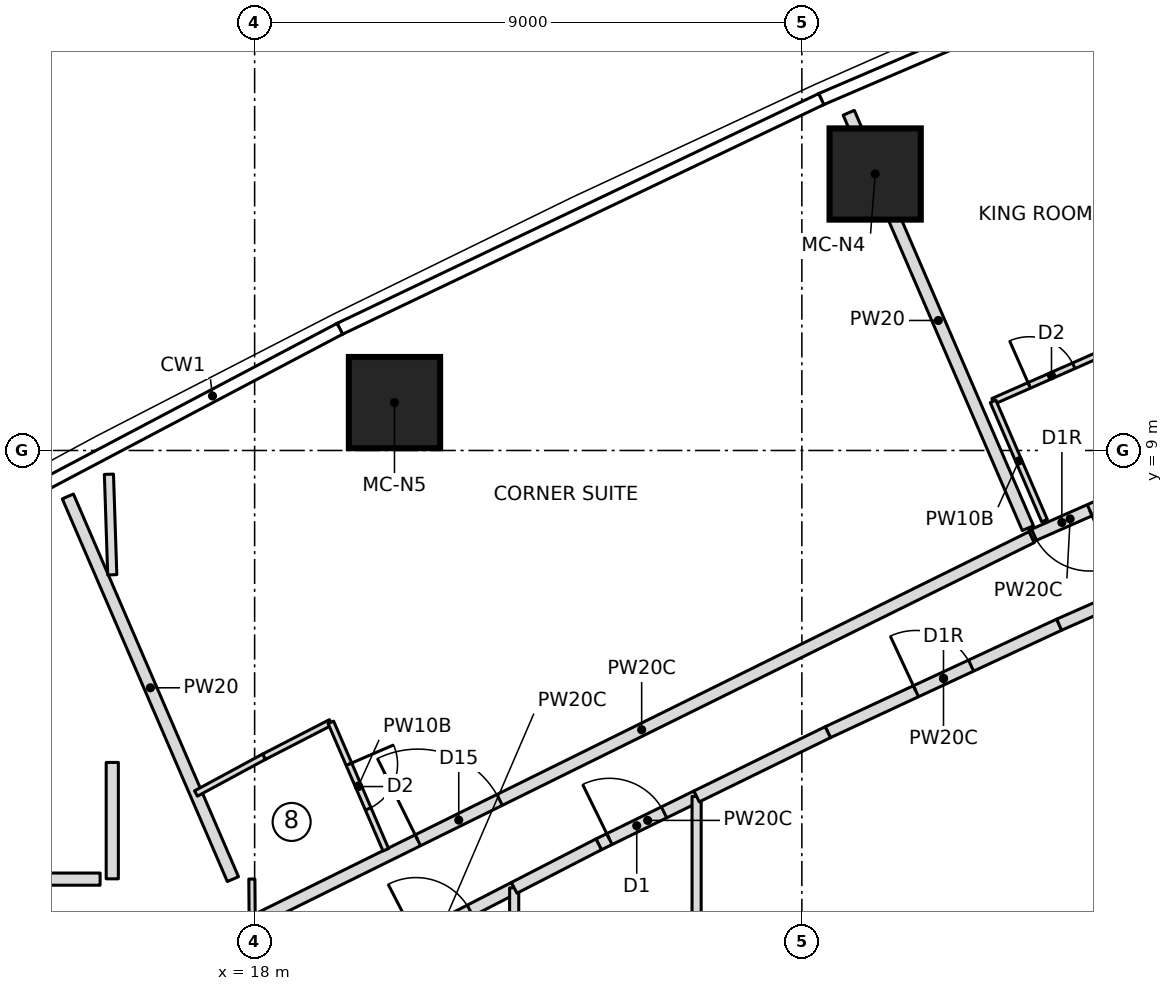
"""IFC4 building model, lengths in metres.
Left out: names, types, materials, properties, quantities, classifications, styles, units other than length and angle.
Written with IfcOpenShell. Run it as: python <this file> out.ifc"""

import sys

from ifc_helpers import new_model, si_unit, direction, frame, frame_2d, origin, origin_2d, place, context, subcontext, project, spatial, rectangle, extrude, element, fill, save


model = new_model("IFC4")
c1 = context("Model", 3, precision=1e-05, world=origin(), true_north=direction((0.0, 1.0)))
c2 = subcontext(c1, "Body", "Model", "MODEL_VIEW")
j1 = project(units=[si_unit("LENGTHUNIT", "METRE"), si_unit("PLANEANGLEUNIT", "RADIAN")], contexts=[c1])
p1 = place(None, origin())
s1 = spatial("IfcSite", under=j1, at=p1, CompositionType="ELEMENT")
p2 = place(p1, origin())
s2 = spatial("IfcBuilding", under=s1, at=p2, CompositionType="ELEMENT")
p3 = place(p2, frame((0.0, 0.0, 133.75)))
s3 = spatial("IfcBuildingStorey", under=s2, at=p3, CompositionType="ELEMENT", Elevation=133.75)
for number, where, z_axis, x_axis in (
    (1, (28.205, 13.547, 0.0), (0.0, 0.0, 1.0), (1.0, 0.0, 0.0)),
    (2, (20.3, 9.788, 0.0), (0.0, 0.0, 1.0), (1.0, 0.0, 0.0)),
):
    element("IfcColumn", number, at=place(p3, frame(where, z_axis=z_axis, x_axis=x_axis)), inside=s3, PredefinedType="COLUMN", context=c2, shape_type="SweptSolid", body=[
        extrude(rectangle(XDim=1.5, YDim=1.5, at=origin_2d()), origin(), (0.0, 0.0, 1.0), 3.55),
    ])
p4 = place(p3, frame((5.654, 1.95, 0.0), z_axis=(0.0, 0.0, 1.0), x_axis=(1.0, 0.0, 0.0)))
e3 = element("IfcWall", 3, at=p4, inside=s3, PredefinedType="PARTITIONING", context=c2, shape_type="SweptSolid", body=[
    extrude(rectangle(XDim=9.804, YDim=0.2, at=frame_2d((4.902, 0.0))), origin(), (0.0, 0.0, 1.0), 3.25),
])
p5 = place(p4, frame((4.618, 0.0, 0.0)))
e4 = element("IfcOpeningElement", 4, at=p5, cuts=e3, PredefinedType="OPENING", context=c2, shape_type="SweptSolid", body=[
    extrude(rectangle(XDim=1.0, YDim=2.1, at=frame_2d((0.5, 1.05))), frame((0.0, 0.11, 0.0), z_axis=(0.0, -1.0, 0.0), x_axis=(1.0, 0.0, 0.0)), (0.0, 0.0, 1.0), 0.22),
])
p6 = place(p3, frame((17.643, 1.95, 0.0), z_axis=(0.0, 0.0, 1.0), x_axis=(-0.395994543879, 0.918252863441, 0.0)))
e5 = element("IfcWall", 5, at=p6, inside=s3, PredefinedType="PARTITIONING", context=c2, shape_type="SweptSolid", body=[
    extrude(rectangle(XDim=6.854, YDim=0.2, at=frame_2d((3.427, 0.0))), origin(), (0.0, 0.0, 1.0), 3.25),
])
p7 = place(p3, frame((17.95, 1.238, 0.0), z_axis=(0.0, 0.0, 1.0), x_axis=(0.896593504408, 0.44285447706, 0.0)))
e6 = element("IfcWall", 6, at=p7, inside=s3, PredefinedType="PARTITIONING", context=c2, shape_type="SweptSolid", body=[
    extrude(rectangle(XDim=14.31, YDim=0.2, at=frame_2d((7.155, 0.0))), origin(), (0.0, 0.0, 1.0), 3.25),
])
p8 = place(p7, frame((3.05, 0.0, 0.0)))
e7 = element("IfcOpeningElement", 7, at=p8, cuts=e6, PredefinedType="OPENING", context=c2, shape_type="SweptSolid", body=[
    extrude(rectangle(XDim=1.5, YDim=2.1, at=frame_2d((0.75, 1.05))), frame((0.0, 0.11, 0.0), z_axis=(0.0, -1.0, 0.0), x_axis=(1.0, 0.0, 0.0)), (0.0, 0.0, 1.0), 0.22),
])
p9 = place(p3, frame((17.036, 3.358, 0.0), z_axis=(0.0, 0.0, 1.0), x_axis=(0.879823588489, 0.475300382009, 0.0)))
e8 = element("IfcWall", 8, at=p9, inside=s3, PredefinedType="PARTITIONING", context=c2, shape_type="SweptSolid", body=[
    extrude(rectangle(XDim=1.273, YDim=0.1, at=frame_2d((0.636, 0.0))), origin(), (0.0, 0.0, 1.0), 3.25),
])
p10 = place(p3, frame((18.156, 3.963, 0.0), z_axis=(0.0, 0.0, 1.0), x_axis=(0.889106231322, 0.457700895154, 0.0)))
e9 = element("IfcWall", 9, at=p10, inside=s3, PredefinedType="PARTITIONING", context=c2, shape_type="SweptSolid", body=[
    extrude(rectangle(XDim=1.235, YDim=0.1, at=frame_2d((0.617, 0.0))), origin(), (0.0, 0.0, 1.0), 3.25),
])
p11 = place(p3, frame((19.254, 4.529, 0.0), z_axis=(0.0, 0.0, 1.0), x_axis=(0.395958457437, -0.9182684248, 0.0)))
e10 = element("IfcWall", 10, at=p11, inside=s3, PredefinedType="PARTITIONING", context=c2, shape_type="SweptSolid", body=[
    extrude(rectangle(XDim=2.282, YDim=0.1, at=frame_2d((1.141, 0.0))), origin(), (0.0, 0.0, 1.0), 3.25),
])
p12 = place(p11, frame((0.75, 0.0, 0.0)))
e11 = element("IfcOpeningElement", 11, at=p12, cuts=e10, PredefinedType="OPENING", context=c2, shape_type="SweptSolid", body=[
    extrude(rectangle(XDim=0.8, YDim=2.1, at=frame_2d((0.4, 1.05))), frame((0.0, 0.06, 0.0), z_axis=(0.0, -1.0, 0.0), x_axis=(1.0, 0.0, 0.0)), (0.0, 0.0, 1.0), 0.12),
])
p13 = place(p3, frame((30.717, 7.722, 0.0), z_axis=(0.0, 0.0, 1.0), x_axis=(-0.395993466394, 0.918253328104, 0.0)))
e12 = element("IfcWall", 12, at=p13, inside=s3, PredefinedType="PARTITIONING", context=c2, shape_type="SweptSolid", body=[
    extrude(rectangle(XDim=7.44, YDim=0.2, at=frame_2d((3.72, 0.0))), origin(), (0.0, 0.0, 1.0), 3.25),
])
p14 = place(p3, frame((32.05, 8.157, 0.0), z_axis=(0.0, 0.0, 1.0), x_axis=(-0.915155082005, -0.403101942293, 0.0)))
e13 = element("IfcWall", 13, at=p14, inside=s3, PredefinedType="PARTITIONING", context=c2, shape_type="SweptSolid", body=[
    extrude(rectangle(XDim=1.396, YDim=0.2, at=frame_2d((0.698, 0.0))), origin(), (0.0, 0.0, 1.0), 3.25),
])
p15 = place(p14, frame((0.346, 0.0, 0.0)))
e14 = element("IfcOpeningElement", 14, at=p15, cuts=e13, PredefinedType="OPENING", context=c2, shape_type="SweptSolid", body=[
    extrude(rectangle(XDim=1.0, YDim=2.1, at=frame_2d((0.5, 1.05))), frame((0.0, 0.11, 0.0), z_axis=(0.0, -1.0, 0.0), x_axis=(1.0, 0.0, 0.0)), (0.0, 0.0, 1.0), 0.22),
])
p16 = place(p3, frame((30.144, 9.809, 0.0), z_axis=(0.0, 0.0, 1.0), x_axis=(0.915122534717, 0.40317582573, 0.0)))
e15 = element("IfcWall", 15, at=p16, inside=s3, PredefinedType="PARTITIONING", context=c2, shape_type="SweptSolid", body=[
    extrude(rectangle(XDim=2.058, YDim=0.1, at=frame_2d((1.029, 0.0))), origin(), (0.0, 0.0, 1.0), 3.25),
])
p17 = place(p16, frame((0.65, 0.0, 0.0)))
e16 = element("IfcOpeningElement", 16, at=p17, cuts=e15, PredefinedType="OPENING", context=c2, shape_type="SweptSolid", body=[
    extrude(rectangle(XDim=0.8, YDim=2.1, at=frame_2d((0.4, 1.05))), frame((0.0, 0.06, 0.0), z_axis=(0.0, -1.0, 0.0), x_axis=(1.0, 0.0, 0.0)), (0.0, 0.0, 1.0), 0.12),
])
p18 = place(p3, frame((30.99, 7.846, 0.0), z_axis=(0.0, 0.0, 1.0), x_axis=(-0.396055229638, 0.918226690462, 0.0)))
e17 = element("IfcWall", 17, at=p18, inside=s3, PredefinedType="PARTITIONING", context=c2, shape_type="SweptSolid", body=[
    extrude(rectangle(XDim=2.137, YDim=0.1, at=frame_2d((1.069, 0.0))), origin(), (0.0, 0.0, 1.0), 3.25),
])
p19 = place(p3, frame((34.092, 10.95, 0.0), z_axis=(0.0, 0.0, 1.0), x_axis=(-0.395991607501, 0.918254129742, 0.0)))
e18 = element("IfcWall", 18, at=p19, inside=s3, PredefinedType="PARTITIONING", context=c2, shape_type="SweptSolid", body=[
    extrude(rectangle(XDim=5.841, YDim=0.2, at=frame_2d((2.92, 0.0))), origin(), (0.0, 0.0, 1.0), 3.25),
])
p20 = place(p3, frame((19.928, 0.602, 0.0), z_axis=(0.0, 0.0, 1.0), x_axis=(0.889134700325, 0.457645588505, 0.0)))
e19 = element("IfcWall", 19, at=p20, inside=s3, PredefinedType="PARTITIONING", context=c2, shape_type="SweptSolid", body=[
    extrude(rectangle(XDim=2.632, YDim=0.2, at=frame_2d((1.316, 0.0))), origin(), (0.0, 0.0, 1.0), 3.25),
])
p21 = place(p20, frame((0.816, 0.0, 0.0)))
e20 = element("IfcOpeningElement", 20, at=p21, cuts=e19, PredefinedType="OPENING", context=c2, shape_type="SweptSolid", body=[
    extrude(rectangle(XDim=1.0, YDim=2.1, at=frame_2d((0.5, 1.05))), frame((0.0, 0.11, 0.0), z_axis=(0.0, -1.0, 0.0), x_axis=(1.0, 0.0, 0.0)), (0.0, 0.0, 1.0), 0.22),
])
p22 = place(p3, frame((22.269, -1.807, 0.0), z_axis=(0.0, 0.0, 1.0), x_axis=(0.0, 1.0, 0.0)))
e21 = element("IfcWall", 21, at=p22, inside=s3, PredefinedType="PARTITIONING", context=c2, shape_type="SweptSolid", body=[
    extrude(rectangle(XDim=3.613, YDim=0.15, at=frame_2d((1.807, 0.0))), origin(), (0.0, 0.0, 1.0), 3.25),
])
p23 = place(p3, frame((23.659, 2.522, 0.0), z_axis=(0.0, 0.0, 1.0), x_axis=(0.898127473276, 0.439735195028, 0.0)))
e22 = element("IfcWall", 22, at=p23, inside=s3, PredefinedType="PARTITIONING", context=c2, shape_type="SweptSolid", body=[
    extrude(rectangle(XDim=1.793, YDim=0.2, at=frame_2d((0.896, 0.0))), origin(), (0.0, 0.0, 1.0), 3.25),
])
p24 = place(p23, frame((0.196, 0.0, 0.0)))
e23 = element("IfcOpeningElement", 23, at=p24, cuts=e22, PredefinedType="OPENING", context=c2, shape_type="SweptSolid", body=[
    extrude(rectangle(XDim=1.0, YDim=2.1, at=frame_2d((0.5, 1.05))), frame((0.0, 0.11, 0.0), z_axis=(0.0, -1.0, 0.0), x_axis=(1.0, 0.0, 0.0)), (0.0, 0.0, 1.0), 0.22),
])
p25 = place(p3, frame((22.269, 1.807, 0.0), z_axis=(0.0, 0.0, 1.0), x_axis=(0.88914982879, 0.457616195039, 0.0)))
e24 = element("IfcWall", 24, at=p25, inside=s3, PredefinedType="PARTITIONING", context=c2, shape_type="SweptSolid", body=[
    extrude(rectangle(XDim=1.563, YDim=0.2, at=frame_2d((0.782, 0.0))), origin(), (0.0, 0.0, 1.0), 3.25),
])
p26 = place(p3, frame((25.269, -3.31, 0.0), z_axis=(0.0, 0.0, 1.0), x_axis=(0.0, 1.0, 0.0)))
e25 = element("IfcWall", 25, at=p26, inside=s3, PredefinedType="PARTITIONING", context=c2, shape_type="SweptSolid", body=[
    extrude(rectangle(XDim=6.621, YDim=0.15, at=frame_2d((3.31, 0.0))), origin(), (0.0, 0.0, 1.0), 3.25),
])
p27 = place(p3, frame((27.427, 4.367, 0.0), z_axis=(0.0, 0.0, 1.0), x_axis=(0.906830275285, 0.421495968933, 0.0)))
e26 = element("IfcWall", 26, at=p27, inside=s3, PredefinedType="PARTITIONING", context=c2, shape_type="SweptSolid", body=[
    extrude(rectangle(XDim=4.195, YDim=0.2, at=frame_2d((2.098, 0.0))), origin(), (0.0, 0.0, 1.0), 3.25),
])
p28 = place(p27, frame((1.598, 0.0, 0.0)))
e27 = element("IfcOpeningElement", 27, at=p28, cuts=e26, PredefinedType="OPENING", context=c2, shape_type="SweptSolid", body=[
    extrude(rectangle(XDim=1.0, YDim=2.1, at=frame_2d((0.5, 1.05))), frame((0.0, 0.11, 0.0), z_axis=(0.0, -1.0, 0.0), x_axis=(1.0, 0.0, 0.0)), (0.0, 0.0, 1.0), 0.22),
])
p29 = place(p3, frame((31.231, 6.135, 0.0), z_axis=(0.0, 0.0, 1.0), x_axis=(0.915102334452, 0.403221672881, 0.0)))
e28 = element("IfcWall", 28, at=p29, inside=s3, PredefinedType="PARTITIONING", context=c2, shape_type="SweptSolid", body=[
    extrude(rectangle(XDim=2.269, YDim=0.2, at=frame_2d((1.135, 0.0))), origin(), (0.0, 0.0, 1.0), 3.25),
])
p30 = place(p3, frame((25.269, 3.31, 0.0), z_axis=(0.0, 0.0, 1.0), x_axis=(0.898155255728, 0.439678446831, 0.0)))
e29 = element("IfcWall", 29, at=p30, inside=s3, PredefinedType="PARTITIONING", context=c2, shape_type="SweptSolid", body=[
    extrude(rectangle(XDim=2.403, YDim=0.2, at=frame_2d((1.201, 0.0))), origin(), (0.0, 0.0, 1.0), 3.25),
])
p31 = place(p3, frame((15.604, 8.609, 0.0), z_axis=(0.0, 0.0, 1.0), x_axis=(0.033196927484, -0.999448830109, 0.0)))
e30 = element("IfcWall", 30, at=p31, inside=s3, PredefinedType="PARTITIONING", context=c2, shape_type="SweptSolid", body=[
    extrude(rectangle(XDim=1.655, YDim=0.15, at=frame_2d((0.827, 0.0))), origin(), (0.0, 0.0, 1.0), 3.25),
])
p32 = place(p3, frame((17.96, 1.249, 0.0), z_axis=(0.0, 0.0, 1.0), x_axis=(-0.007291472831, 0.999973416859, 0.0)))
e31 = element("IfcWall", 31, at=p32, inside=s3, PredefinedType="PARTITIONING", context=c2, shape_type="SweptSolid", body=[
    extrude(rectangle(XDim=0.703, YDim=0.1, at=frame_2d((0.352, 0.0))), origin(), (0.0, 0.0, 1.0), 3.25),
])
p33 = place(p3, frame((15.659, 3.869, 0.0), z_axis=(0.0, 0.0, 1.0), x_axis=(0.0, -1.0, 0.0)))
e32 = element("IfcWall", 32, at=p33, inside=s3, PredefinedType="PARTITIONING", context=c2, shape_type="SweptSolid", body=[
    extrude(rectangle(XDim=1.914, YDim=0.2, at=frame_2d((0.957, 0.0))), origin(), (0.0, 0.0, 1.0), 3.25),
])
p34 = place(p12, origin())
e33 = element("IfcDoor", 33, at=p34, inside=s3, OperationType="SINGLE_SWING_LEFT", PredefinedType="DOOR", context=c2, shape_type="SweptSolid", body=[
    extrude(rectangle(XDim=0.8, YDim=2.1, at=frame_2d((0.4, 1.05))), frame((0.0, 0.025, 0.0), z_axis=(0.0, -1.0, 0.0), x_axis=(1.0, 0.0, 0.0)), (0.0, 0.0, 1.0), 0.05),
])
fill(e11, e33)
p35 = place(p8, origin())
e34 = element("IfcDoor", 34, at=p35, inside=s3, OperationType="DOUBLE_DOOR_SINGLE_SWING", PredefinedType="DOOR", context=c2, shape_type="SweptSolid", body=[
    extrude(rectangle(XDim=1.5, YDim=2.1, at=frame_2d((0.75, 1.05))), frame((0.0, 0.025, 0.0), z_axis=(0.0, -1.0, 0.0), x_axis=(1.0, 0.0, 0.0)), (0.0, 0.0, 1.0), 0.05),
])
fill(e7, e34)
p36 = place(p17, origin())
e35 = element("IfcDoor", 35, at=p36, inside=s3, OperationType="SINGLE_SWING_LEFT", PredefinedType="DOOR", context=c2, shape_type="SweptSolid", body=[
    extrude(rectangle(XDim=0.8, YDim=2.1, at=frame_2d((0.4, 1.05))), frame((0.0, 0.025, 0.0), z_axis=(0.0, -1.0, 0.0), x_axis=(1.0, 0.0, 0.0)), (0.0, 0.0, 1.0), 0.05),
])
fill(e16, e35)
p37 = place(p15, origin())
e36 = element("IfcDoor", 36, at=p37, inside=s3, OperationType="SINGLE_SWING_RIGHT", PredefinedType="DOOR", context=c2, shape_type="SweptSolid", body=[
    extrude(rectangle(XDim=1.0, YDim=2.1, at=frame_2d((0.5, 1.05))), frame((0.0, 0.025, 0.0), z_axis=(0.0, -1.0, 0.0), x_axis=(1.0, 0.0, 0.0)), (0.0, 0.0, 1.0), 0.05),
])
fill(e14, e36)
p38 = place(p21, origin())
e37 = element("IfcDoor", 37, at=p38, inside=s3, OperationType="SINGLE_SWING_RIGHT", PredefinedType="DOOR", context=c2, shape_type="SweptSolid", body=[
    extrude(rectangle(XDim=1.0, YDim=2.1, at=frame_2d((0.5, 1.05))), frame((0.0, 0.025, 0.0), z_axis=(0.0, -1.0, 0.0), x_axis=(1.0, 0.0, 0.0)), (0.0, 0.0, 1.0), 0.05),
])
fill(e20, e37)
p39 = place(p24, origin())
e38 = element("IfcDoor", 38, at=p39, inside=s3, OperationType="SINGLE_SWING_LEFT", PredefinedType="DOOR", context=c2, shape_type="SweptSolid", body=[
    extrude(rectangle(XDim=1.0, YDim=2.1, at=frame_2d((0.5, 1.05))), frame((0.0, 0.025, 0.0), z_axis=(0.0, -1.0, 0.0), x_axis=(1.0, 0.0, 0.0)), (0.0, 0.0, 1.0), 0.05),
])
fill(e23, e38)
p40 = place(p28, origin())
e39 = element("IfcDoor", 39, at=p40, inside=s3, OperationType="SINGLE_SWING_RIGHT", PredefinedType="DOOR", context=c2, shape_type="SweptSolid", body=[
    extrude(rectangle(XDim=1.0, YDim=2.1, at=frame_2d((0.5, 1.05))), frame((0.0, 0.025, 0.0), z_axis=(0.0, -1.0, 0.0), x_axis=(1.0, 0.0, 0.0)), (0.0, 0.0, 1.0), 0.05),
])
fill(e27, e39)
save(model, sys.argv[1])
